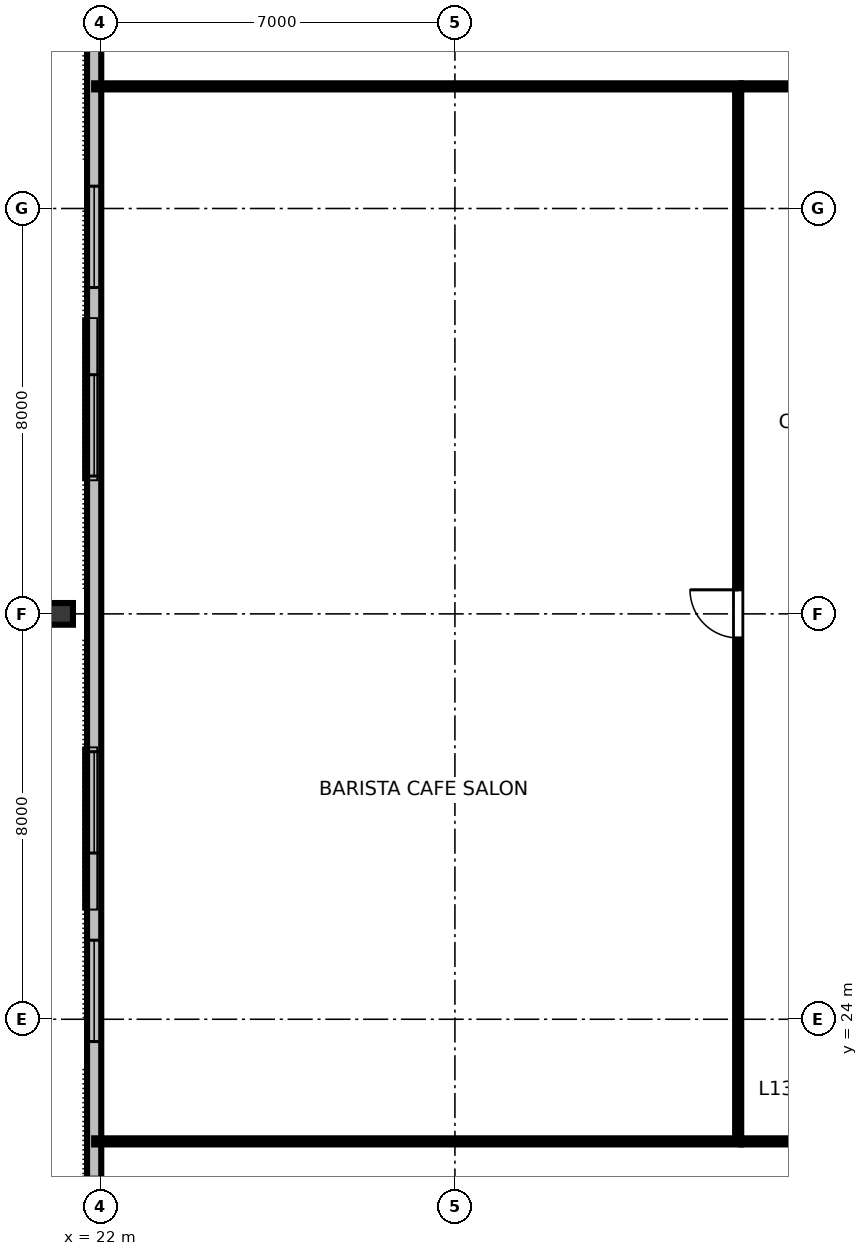
"""IFC4 building model, lengths in metres.
Left out: names, types, materials, properties, quantities, classifications, styles, units other than length and angle.
Written with IfcOpenShell. Run it as: python <this file> out.ifc"""

import sys

from ifc_helpers import new_model, si_unit, direction, frame, frame_2d, origin, origin_2d, place, context, subcontext, project, spatial, rectangle, i_section, extrude, element, fill, save


model = new_model("IFC4")
c1 = context("Model", 3, precision=1e-05, world=origin(), true_north=direction((0.0, 1.0)))
c2 = subcontext(c1, "Body", "Model", "MODEL_VIEW")
j1 = project(units=[si_unit("LENGTHUNIT", "METRE"), si_unit("PLANEANGLEUNIT", "RADIAN")], contexts=[c1])
p1 = place(None, origin())
s1 = spatial("IfcSite", under=j1, at=p1, CompositionType="ELEMENT")
p2 = place(p1, origin())
s2 = spatial("IfcBuilding", under=s1, at=p2, CompositionType="ELEMENT")
p3 = place(p2, frame((0.0, 0.0, 53.2)))
s3 = spatial("IfcBuildingStorey", under=s2, at=p3, CompositionType="ELEMENT", Elevation=53.2)
p4 = place(p3, frame((21.22, 32.0, 0.0), z_axis=(0.0, 0.0, 1.0), x_axis=(0.0, 1.0, 0.0)))
e1 = element("IfcColumn", 1, at=p4, inside=s3, PredefinedType="COLUMN", context=c2, shape_type="SweptSolid", body=[
    extrude(i_section(OverallWidth=0.428, OverallDepth=0.483, WebThickness=0.051, FlangeThickness=0.082, FilletRadius=0.025, at=origin_2d()), origin(), (0.0, 0.0, 1.0), 3.358),
])
p5 = place(p3, frame((21.88, 49.84, 0.0), z_axis=(0.0, 0.0, 1.0), x_axis=(0.0, -1.0, 0.0)))
e2 = element("IfcWall", 2, at=p5, inside=s3, PredefinedType="STANDARD", context=c2, shape_type="SweptSolid", body=[
    extrude(rectangle(XDim=35.68, YDim=0.28, at=frame_2d((17.84, 0.0))), origin(), (0.0, 0.0, 1.0), 3.36),
])
p6 = place(p5, frame((1.96, 0.0, 0.8)))
e3 = element("IfcOpeningElement", 3, at=p6, cuts=e2, PredefinedType="OPENING", context=c2, shape_type="SweptSolid", body=[
    extrude(rectangle(XDim=2.0, YDim=1.95, at=frame_2d((1.0, 0.975))), frame((0.0, 0.15, 0.0), z_axis=(0.0, -1.0, 0.0), x_axis=(1.0, 0.0, 0.0)), (0.0, 0.0, 1.0), 0.3),
])
p7 = place(p5, frame((9.4, 0.0, 0.8)))
e4 = element("IfcOpeningElement", 4, at=p7, cuts=e2, PredefinedType="OPENING", context=c2, shape_type="SweptSolid", body=[
    extrude(rectangle(XDim=2.0, YDim=1.95, at=frame_2d((1.0, 0.975))), frame((0.0, 0.15, 0.0), z_axis=(0.0, -1.0, 0.0), x_axis=(1.0, 0.0, 0.0)), (0.0, 0.0, 1.0), 0.3),
])
p8 = place(p5, frame((13.12, 0.0, 0.8)))
e5 = element("IfcOpeningElement", 5, at=p8, cuts=e2, PredefinedType="OPENING", context=c2, shape_type="SweptSolid", body=[
    extrude(rectangle(XDim=2.0, YDim=1.95, at=frame_2d((1.0, 0.975))), frame((0.0, 0.15, 0.0), z_axis=(0.0, -1.0, 0.0), x_axis=(1.0, 0.0, 0.0)), (0.0, 0.0, 1.0), 0.3),
])
p9 = place(p5, frame((20.56, 0.0, 0.8)))
e6 = element("IfcOpeningElement", 6, at=p9, cuts=e2, PredefinedType="OPENING", context=c2, shape_type="SweptSolid", body=[
    extrude(rectangle(XDim=2.0, YDim=1.95, at=frame_2d((1.0, 0.975))), frame((0.0, 0.15, 0.0), z_axis=(0.0, -1.0, 0.0), x_axis=(1.0, 0.0, 0.0)), (0.0, 0.0, 1.0), 0.3),
])
p10 = place(p5, frame((24.28, 0.0, 0.8)))
e7 = element("IfcOpeningElement", 7, at=p10, cuts=e2, PredefinedType="OPENING", context=c2, shape_type="SweptSolid", body=[
    extrude(rectangle(XDim=2.0, YDim=1.95, at=frame_2d((1.0, 0.975))), frame((0.0, 0.15, 0.0), z_axis=(0.0, -1.0, 0.0), x_axis=(1.0, 0.0, 0.0)), (0.0, 0.0, 1.0), 0.3),
])
p11 = place(p5, frame((31.72, 0.0, 0.8)))
e8 = element("IfcOpeningElement", 8, at=p11, cuts=e2, PredefinedType="OPENING", context=c2, shape_type="SweptSolid", body=[
    extrude(rectangle(XDim=2.0, YDim=1.95, at=frame_2d((1.0, 0.975))), frame((0.0, 0.15, 0.0), z_axis=(0.0, -1.0, 0.0), x_axis=(1.0, 0.0, 0.0)), (0.0, 0.0, 1.0), 0.3),
])
p12 = place(p3, frame((34.65, 21.59, 0.0), z_axis=(0.0, 0.0, 1.0), x_axis=(1.0, 0.0, 0.0)))
e9 = element("IfcWall", 9, at=p12, inside=s3, PredefinedType="PARTITIONING", context=c2, shape_type="SweptSolid", body=[
    extrude(rectangle(XDim=22.7, YDim=0.12, at=frame_2d((11.35, 0.0))), origin(), (0.0, 0.0, 1.0), 2.64),
])
p13 = place(p12, frame((2.045, 0.0, 0.0)))
e10 = element("IfcOpeningElement", 10, at=p13, cuts=e9, PredefinedType="OPENING", context=c2, shape_type="SweptSolid", body=[
    extrude(rectangle(XDim=0.95, YDim=2.15, at=frame_2d((0.475, 1.075))), frame((0.0, 0.07, 0.0), z_axis=(0.0, -1.0, 0.0), x_axis=(1.0, 0.0, 0.0)), (0.0, 0.0, 1.0), 0.14),
])
p14 = place(p12, frame((7.126, 0.0, 0.0)))
e11 = element("IfcOpeningElement", 11, at=p14, cuts=e9, PredefinedType="OPENING", context=c2, shape_type="SweptSolid", body=[
    extrude(rectangle(XDim=0.95, YDim=2.15, at=frame_2d((0.475, 1.075))), frame((0.0, 0.07, 0.0), z_axis=(0.0, -1.0, 0.0), x_axis=(1.0, 0.0, 0.0)), (0.0, 0.0, 1.0), 0.14),
])
p15 = place(p12, frame((11.509, 0.0, 0.0)))
e12 = element("IfcOpeningElement", 12, at=p15, cuts=e9, PredefinedType="OPENING", context=c2, shape_type="SweptSolid", body=[
    extrude(rectangle(XDim=0.95, YDim=2.15, at=frame_2d((0.475, 1.075))), frame((0.0, 0.07, 0.0), z_axis=(0.0, -1.0, 0.0), x_axis=(1.0, 0.0, 0.0)), (0.0, 0.0, 1.0), 0.14),
])
p16 = place(p12, frame((17.638, 0.0, 0.0)))
e13 = element("IfcOpeningElement", 13, at=p16, cuts=e9, PredefinedType="OPENING", context=c2, shape_type="SweptSolid", body=[
    extrude(rectangle(XDim=0.95, YDim=2.15, at=frame_2d((0.475, 1.075))), frame((0.0, 0.07, 0.0), z_axis=(0.0, -1.0, 0.0), x_axis=(1.0, 0.0, 0.0)), (0.0, 0.0, 1.0), 0.14),
])
p17 = place(p3, frame((34.65, 42.41, 0.0), z_axis=(0.0, 0.0, 1.0), x_axis=(1.0, 0.0, 0.0)))
e14 = element("IfcWall", 14, at=p17, inside=s3, PredefinedType="PARTITIONING", context=c2, shape_type="SweptSolid", body=[
    extrude(rectangle(XDim=22.7, YDim=0.12, at=frame_2d((11.35, 0.0))), origin(), (0.0, 0.0, 1.0), 2.64),
])
p18 = place(p17, frame((5.745, 0.0, 0.0)))
e15 = element("IfcOpeningElement", 15, at=p18, cuts=e14, PredefinedType="OPENING", context=c2, shape_type="SweptSolid", body=[
    extrude(rectangle(XDim=0.95, YDim=2.15, at=frame_2d((0.475, 1.075))), frame((0.0, 0.07, 0.0), z_axis=(0.0, -1.0, 0.0), x_axis=(1.0, 0.0, 0.0)), (0.0, 0.0, 1.0), 0.14),
])
p19 = place(p17, frame((16.955, 0.0, 0.0)))
e16 = element("IfcOpeningElement", 16, at=p19, cuts=e14, PredefinedType="OPENING", context=c2, shape_type="SweptSolid", body=[
    extrude(rectangle(XDim=0.95, YDim=2.15, at=frame_2d((0.475, 1.075))), frame((0.0, 0.07, 0.0), z_axis=(0.0, -1.0, 0.0), x_axis=(1.0, 0.0, 0.0)), (0.0, 0.0, 1.0), 0.14),
])
p20 = place(p3, frame((34.59, 21.65, 0.0), z_axis=(0.0, 0.0, 1.0), x_axis=(0.0, 1.0, 0.0)))
e17 = element("IfcWall", 17, at=p20, inside=s3, PredefinedType="PARTITIONING", context=c2, shape_type="SweptSolid", body=[
    extrude(rectangle(XDim=20.7, YDim=0.12, at=frame_2d((10.35, 0.0))), origin(), (0.0, 0.0, 1.0), 2.64),
])
p21 = place(p20, frame((9.875, 0.0, 0.0)))
e18 = element("IfcOpeningElement", 18, at=p21, cuts=e17, PredefinedType="OPENING", context=c2, shape_type="SweptSolid", body=[
    extrude(rectangle(XDim=0.95, YDim=2.15, at=frame_2d((0.475, 1.075))), frame((0.0, 0.07, 0.0), z_axis=(0.0, -1.0, 0.0), x_axis=(1.0, 0.0, 0.0)), (0.0, 0.0, 1.0), 0.14),
])
for number, where, z_axis, x_axis in (
    (19, (34.65, 21.59, 0.0), (0.0, 0.0, 1.0), (-1.0, 0.0, 0.0)),
    (20, (34.65, 42.41, 0.0), (0.0, 0.0, 1.0), (-1.0, 0.0, 0.0)),
):
    element("IfcWall", number, at=place(p3, frame(where, z_axis=z_axis, x_axis=x_axis)), inside=s3, PredefinedType="PARTITIONING", context=c2, shape_type="SweptSolid", body=[
        extrude(rectangle(XDim=12.77, YDim=0.12, at=frame_2d((6.385, 0.0))), origin(), (0.0, 0.0, 1.0), 2.64),
    ])
p22 = place(p7, origin())
e21 = element("IfcWindow", 21, at=p22, inside=s3, PartitioningType="SINGLE_PANEL", PredefinedType="WINDOW", context=c2, shape_type="SweptSolid", body=[
    extrude(rectangle(XDim=2.0, YDim=1.95, at=frame_2d((1.0, 0.975))), frame((0.0, 0.03, 0.0), z_axis=(0.0, -1.0, 0.0), x_axis=(1.0, 0.0, 0.0)), (0.0, 0.0, 1.0), 0.06),
])
fill(e4, e21)
p23 = place(p8, origin())
e22 = element("IfcWindow", 22, at=p23, inside=s3, PartitioningType="SINGLE_PANEL", PredefinedType="WINDOW", context=c2, shape_type="SweptSolid", body=[
    extrude(rectangle(XDim=2.0, YDim=1.95, at=frame_2d((1.0, 0.975))), frame((0.0, 0.03, 0.0), z_axis=(0.0, -1.0, 0.0), x_axis=(1.0, 0.0, 0.0)), (0.0, 0.0, 1.0), 0.06),
])
fill(e5, e22)
p24 = place(p9, origin())
e23 = element("IfcWindow", 23, at=p24, inside=s3, PartitioningType="SINGLE_PANEL", PredefinedType="WINDOW", context=c2, shape_type="SweptSolid", body=[
    extrude(rectangle(XDim=2.0, YDim=1.95, at=frame_2d((1.0, 0.975))), frame((0.0, 0.03, 0.0), z_axis=(0.0, -1.0, 0.0), x_axis=(1.0, 0.0, 0.0)), (0.0, 0.0, 1.0), 0.06),
])
fill(e6, e23)
p25 = place(p10, origin())
e24 = element("IfcWindow", 24, at=p25, inside=s3, PartitioningType="SINGLE_PANEL", PredefinedType="WINDOW", context=c2, shape_type="SweptSolid", body=[
    extrude(rectangle(XDim=2.0, YDim=1.95, at=frame_2d((1.0, 0.975))), frame((0.0, 0.03, 0.0), z_axis=(0.0, -1.0, 0.0), x_axis=(1.0, 0.0, 0.0)), (0.0, 0.0, 1.0), 0.06),
])
fill(e7, e24)
p26 = place(p21, origin())
e25 = element("IfcDoor", 25, at=p26, inside=s3, OperationType="SINGLE_SWING_RIGHT", PredefinedType="DOOR", context=c2, shape_type="SweptSolid", body=[
    extrude(rectangle(XDim=0.95, YDim=2.15, at=frame_2d((0.475, 1.075))), frame((0.0, 0.025, 0.0), z_axis=(0.0, -1.0, 0.0), x_axis=(1.0, 0.0, 0.0)), (0.0, 0.0, 1.0), 0.05),
])
fill(e18, e25)
save(model, sys.argv[1])
